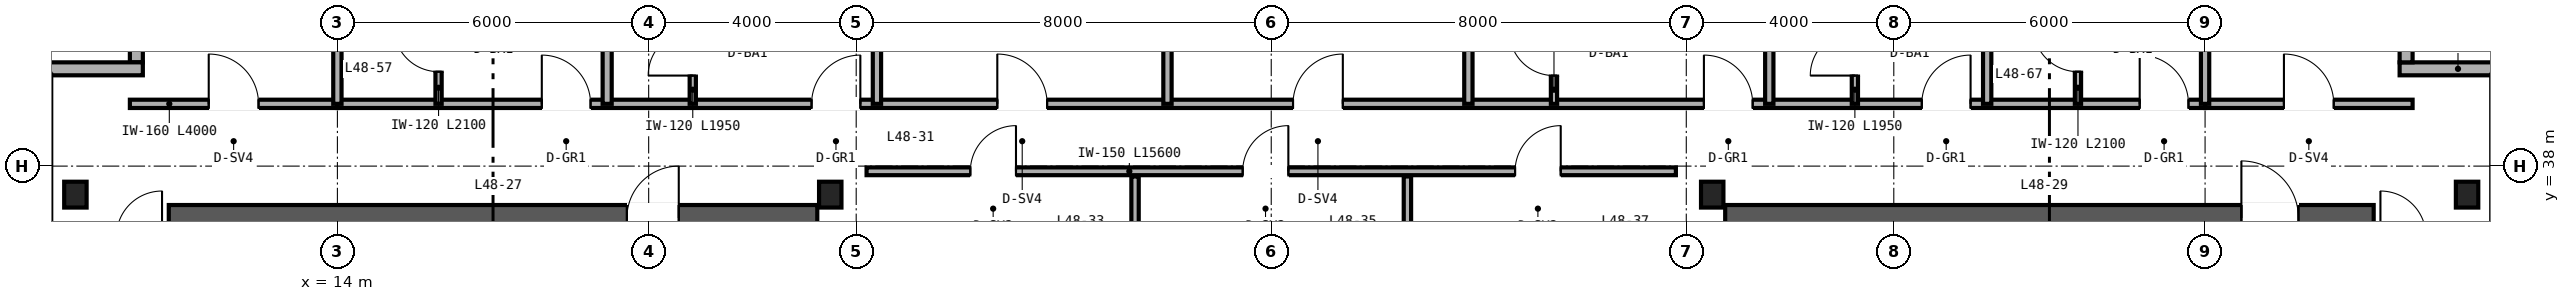
"""IFC4 building model, lengths in metres.
Left out: names, types, materials, properties, quantities, classifications, styles, units other than length and angle.
Written with IfcOpenShell. Run it as: python <this file> out.ifc"""

import sys

from ifc_helpers import new_model, si_unit, direction, frame, frame_2d, origin, origin_2d, place, context, subcontext, project, spatial, rectangle, i_section, extrude, source, transform, mapped, element, fill, save


model = new_model("IFC4")
c1 = context("Model", 3, precision=1e-05, world=origin(), true_north=direction((0.0, 1.0)))
c2 = subcontext(c1, "Body", "Model", "MODEL_VIEW")
j1 = project(units=[si_unit("LENGTHUNIT", "METRE"), si_unit("PLANEANGLEUNIT", "RADIAN")], contexts=[c1])
p1 = place(None, origin())
s1 = spatial("IfcSite", under=j1, at=p1, CompositionType="ELEMENT")
p2 = place(p1, origin())
s2 = spatial("IfcBuilding", under=s1, at=p2, CompositionType="ELEMENT")
p3 = place(p2, frame((0.0, 0.0, 192.0)))
s3 = spatial("IfcBuildingStorey", under=s2, at=p3, CompositionType="ELEMENT", Elevation=192.0)
p4 = place(p3, frame((10.75, 37.0, 0.0), z_axis=(0.0, 0.0, 1.0), x_axis=(1.0, 0.0, 0.0)))
e1 = element("IfcWall", 1, at=p4, inside=s3, PredefinedType="SHEAR", context=c2, shape_type="SweptSolid", body=[
    extrude(rectangle(XDim=12.5, YDim=0.5, at=frame_2d((6.25, 0.0))), origin(), (0.0, 0.0, 1.0), 3.37),
])
p5 = place(p4, frame((8.83, 0.0, 0.0)))
e2 = element("IfcOpeningElement", 2, at=p5, cuts=e1, PredefinedType="OPENING", context=c2, shape_type="SweptSolid", body=[
    extrude(rectangle(XDim=1.0, YDim=2.15, at=frame_2d((0.5, 1.075))), frame((0.0, 0.26, 0.0), z_axis=(0.0, -1.0, 0.0), x_axis=(1.0, 0.0, 0.0)), (0.0, 0.0, 1.0), 0.52),
])
p6 = place(p3, frame((40.75, 37.0, 0.0), z_axis=(0.0, 0.0, 1.0), x_axis=(1.0, 0.0, 0.0)))
e3 = element("IfcWall", 3, at=p6, inside=s3, PredefinedType="SHEAR", context=c2, shape_type="SweptSolid", body=[
    extrude(rectangle(XDim=12.5, YDim=0.5, at=frame_2d((6.25, 0.0))), origin(), (0.0, 0.0, 1.0), 3.37),
])
p7 = place(p6, frame((9.95, 0.0, 0.0)))
e4 = element("IfcOpeningElement", 4, at=p7, cuts=e3, PredefinedType="OPENING", context=c2, shape_type="SweptSolid", body=[
    extrude(rectangle(XDim=1.1, YDim=2.15, at=frame_2d((0.55, 1.075))), frame((0.0, 0.26, 0.0), z_axis=(0.0, -1.0, 0.0), x_axis=(1.0, 0.0, 0.0)), (0.0, 0.0, 1.0), 0.52),
])
m1 = source(origin(), c2, "Body", "SweptSolid", [
    extrude(i_section(OverallWidth=0.432, OverallDepth=0.498, WebThickness=0.056, FlangeThickness=0.089, FilletRadius=0.025, at=origin_2d()), origin(), (0.0, 0.0, 1.0), 3.37),
])
for number, where, z_axis, x_axis in (
    (5, (8.95, 37.45, 0.0), (0.0, 0.0, 1.0), (1.0, 0.0, 0.0)),
    (6, (23.5, 37.45, 0.0), (0.0, 0.0, 1.0), (1.0, 0.0, 0.0)),
    (7, (40.5, 37.45, 0.0), (0.0, 0.0, 1.0), (1.0, 0.0, 0.0)),
    (8, (55.05, 37.45, 0.0), (0.0, 0.0, 1.0), (1.0, 0.0, 0.0)),
):
    element("IfcColumn", number, at=place(p3, frame(where, z_axis=z_axis, x_axis=x_axis)), inside=s3, PredefinedType="COLUMN", context=c2, shape_type="MappedRepresentation", body=[
        mapped(m1, transform((0.0, 0.0, 0.0), scale=1.0)),
    ])
p8 = place(p3, frame((56.0, 39.875, 0.0), z_axis=(0.0, 0.0, 1.0), x_axis=(-1.0, 0.0, 0.0)))
e9 = element("IfcWall", 9, at=p8, inside=s3, PredefinedType="SOLIDWALL", context=c2, shape_type="SweptSolid", body=[
    extrude(rectangle(XDim=2.25, YDim=0.25, at=frame_2d((1.125, 0.0))), origin(), (0.0, 0.0, 1.0), 3.37),
])
for number, where, z_axis, x_axis in (
    (10, (53.875, 40.0, 0.0), (0.0, 0.0, 1.0), (0.0, 1.0, 0.0)),
    (11, (10.125, 42.0, 0.0), (0.0, 0.0, 1.0), (0.0, -1.0, 0.0)),
):
    element("IfcWall", number, at=place(p3, frame(where, z_axis=z_axis, x_axis=x_axis)), inside=s3, PredefinedType="SOLIDWALL", context=c2, shape_type="SweptSolid", body=[
        extrude(rectangle(XDim=2.0, YDim=0.25, at=frame_2d((1.0, 0.0))), origin(), (0.0, 0.0, 1.0), 3.37),
    ])
p9 = place(p3, frame((10.25, 39.875, 0.0), z_axis=(0.0, 0.0, 1.0), x_axis=(-1.0, 0.0, 0.0)))
e12 = element("IfcWall", 12, at=p9, inside=s3, PredefinedType="SOLIDWALL", context=c2, shape_type="SweptSolid", body=[
    extrude(rectangle(XDim=2.25, YDim=0.25, at=frame_2d((1.125, 0.0))), origin(), (0.0, 0.0, 1.0), 3.37),
])
p10 = place(p3, frame((24.2, 37.9, 0.0), z_axis=(0.0, 0.0, 1.0), x_axis=(1.0, 0.0, 0.0)))
e13 = element("IfcWall", 13, at=p10, inside=s3, PredefinedType="PARTITIONING", context=c2, shape_type="SweptSolid", body=[
    extrude(rectangle(XDim=15.6, YDim=0.15, at=frame_2d((7.8, 0.0))), origin(), (0.0, 0.0, 1.0), 3.37),
])
p11 = place(p10, frame((2.0, 0.0, 0.0)))
e14 = element("IfcOpeningElement", 14, at=p11, cuts=e13, PredefinedType="OPENING", context=c2, shape_type="SweptSolid", body=[
    extrude(rectangle(XDim=0.88, YDim=2.15, at=frame_2d((0.44, 1.075))), frame((0.0, 0.085, 0.0), z_axis=(0.0, -1.0, 0.0), x_axis=(1.0, 0.0, 0.0)), (0.0, 0.0, 1.0), 0.17),
])
p12 = place(p10, frame((7.25, 0.0, 0.0)))
e15 = element("IfcOpeningElement", 15, at=p12, cuts=e13, PredefinedType="OPENING", context=c2, shape_type="SweptSolid", body=[
    extrude(rectangle(XDim=0.88, YDim=2.15, at=frame_2d((0.44, 1.075))), frame((0.0, 0.085, 0.0), z_axis=(0.0, -1.0, 0.0), x_axis=(1.0, 0.0, 0.0)), (0.0, 0.0, 1.0), 0.17),
])
p13 = place(p10, frame((12.5, 0.0, 0.0)))
e16 = element("IfcOpeningElement", 16, at=p13, cuts=e13, PredefinedType="OPENING", context=c2, shape_type="SweptSolid", body=[
    extrude(rectangle(XDim=0.88, YDim=2.15, at=frame_2d((0.44, 1.075))), frame((0.0, 0.085, 0.0), z_axis=(0.0, -1.0, 0.0), x_axis=(1.0, 0.0, 0.0)), (0.0, 0.0, 1.0), 0.17),
])
for number, where, z_axis, x_axis in (
    (17, (29.375, 36.12, 0.0), (0.0, 0.0, 1.0), (0.0, 1.0, 0.0)),
    (18, (34.625, 36.12, 0.0), (0.0, 0.0, 1.0), (0.0, 1.0, 0.0)),
):
    element("IfcWall", number, at=place(p3, frame(where, z_axis=z_axis, x_axis=x_axis)), inside=s3, PredefinedType="PARTITIONING", context=c2, shape_type="SweptSolid", body=[
        extrude(rectangle(XDim=1.68, YDim=0.142, at=frame_2d((0.84, 0.0))), origin(), (0.0, 0.0, 1.0), 3.37),
    ])
p14 = place(p3, frame((10.0, 39.2, 0.0), z_axis=(0.0, 0.0, 1.0), x_axis=(1.0, 0.0, 0.0)))
e19 = element("IfcWall", 19, at=p14, inside=s3, PredefinedType="PARTITIONING", context=c2, shape_type="SweptSolid", body=[
    extrude(rectangle(XDim=4.0, YDim=0.16, at=frame_2d((2.0, 0.0))), origin(), (0.0, 0.0, 1.0), 3.37),
])
p15 = place(p14, frame((1.52, 0.0, 0.0)))
e20 = element("IfcOpeningElement", 20, at=p15, cuts=e19, PredefinedType="OPENING", context=c2, shape_type="SweptSolid", body=[
    extrude(rectangle(XDim=0.96, YDim=2.15, at=frame_2d((0.48, 1.075))), frame((0.0, 0.09, 0.0), z_axis=(0.0, -1.0, 0.0), x_axis=(1.0, 0.0, 0.0)), (0.0, 0.0, 1.0), 0.18),
])
p16 = place(p3, frame((50.0, 39.2, 0.0), z_axis=(0.0, 0.0, 1.0), x_axis=(1.0, 0.0, 0.0)))
e21 = element("IfcWall", 21, at=p16, inside=s3, PredefinedType="PARTITIONING", context=c2, shape_type="SweptSolid", body=[
    extrude(rectangle(XDim=4.0, YDim=0.16, at=frame_2d((2.0, 0.0))), origin(), (0.0, 0.0, 1.0), 3.37),
])
p17 = place(p16, frame((1.52, 0.0, 0.0)))
e22 = element("IfcOpeningElement", 22, at=p17, cuts=e21, PredefinedType="OPENING", context=c2, shape_type="SweptSolid", body=[
    extrude(rectangle(XDim=0.96, YDim=2.15, at=frame_2d((0.48, 1.075))), frame((0.0, 0.09, 0.0), z_axis=(0.0, -1.0, 0.0), x_axis=(1.0, 0.0, 0.0)), (0.0, 0.0, 1.0), 0.18),
])
p18 = place(p3, frame((14.0, 39.2, 0.0), z_axis=(0.0, 0.0, 1.0), x_axis=(1.0, 0.0, 0.0)))
e23 = element("IfcWall", 23, at=p18, inside=s3, PredefinedType="PARTITIONING", context=c2, shape_type="SweptSolid", body=[
    extrude(rectangle(XDim=36.0, YDim=0.16, at=frame_2d((18.0, 0.0))), origin(), (0.0, 0.0, 1.0), 2.913),
])
p19 = place(p18, frame((3.94, 0.0, 0.0)))
e24 = element("IfcOpeningElement", 24, at=p19, cuts=e23, PredefinedType="OPENING", context=c2, shape_type="SweptSolid", body=[
    extrude(rectangle(XDim=0.94, YDim=2.15, at=frame_2d((0.47, 1.075))), frame((0.0, 0.09, 0.0), z_axis=(0.0, -1.0, 0.0), x_axis=(1.0, 0.0, 0.0)), (0.0, 0.0, 1.0), 0.18),
])
p20 = place(p18, frame((9.14, 0.0, 0.0)))
e25 = element("IfcOpeningElement", 25, at=p20, cuts=e23, PredefinedType="OPENING", context=c2, shape_type="SweptSolid", body=[
    extrude(rectangle(XDim=0.94, YDim=2.15, at=frame_2d((0.47, 1.075))), frame((0.0, 0.09, 0.0), z_axis=(0.0, -1.0, 0.0), x_axis=(1.0, 0.0, 0.0)), (0.0, 0.0, 1.0), 0.18),
])
p21 = place(p18, frame((12.72, 0.0, 0.0)))
e26 = element("IfcOpeningElement", 26, at=p21, cuts=e23, PredefinedType="OPENING", context=c2, shape_type="SweptSolid", body=[
    extrude(rectangle(XDim=0.96, YDim=2.15, at=frame_2d((0.48, 1.075))), frame((0.0, 0.09, 0.0), z_axis=(0.0, -1.0, 0.0), x_axis=(1.0, 0.0, 0.0)), (0.0, 0.0, 1.0), 0.18),
])
p22 = place(p18, frame((18.42, 0.0, 0.0)))
e27 = element("IfcOpeningElement", 27, at=p22, cuts=e23, PredefinedType="OPENING", context=c2, shape_type="SweptSolid", body=[
    extrude(rectangle(XDim=0.96, YDim=2.15, at=frame_2d((0.48, 1.075))), frame((0.0, 0.09, 0.0), z_axis=(0.0, -1.0, 0.0), x_axis=(1.0, 0.0, 0.0)), (0.0, 0.0, 1.0), 0.18),
])
p23 = place(p18, frame((26.34, 0.0, 0.0)))
e28 = element("IfcOpeningElement", 28, at=p23, cuts=e23, PredefinedType="OPENING", context=c2, shape_type="SweptSolid", body=[
    extrude(rectangle(XDim=0.94, YDim=2.15, at=frame_2d((0.47, 1.075))), frame((0.0, 0.09, 0.0), z_axis=(0.0, -1.0, 0.0), x_axis=(1.0, 0.0, 0.0)), (0.0, 0.0, 1.0), 0.18),
])
p24 = place(p18, frame((30.54, 0.0, 0.0)))
e29 = element("IfcOpeningElement", 29, at=p24, cuts=e23, PredefinedType="OPENING", context=c2, shape_type="SweptSolid", body=[
    extrude(rectangle(XDim=0.94, YDim=2.15, at=frame_2d((0.47, 1.075))), frame((0.0, 0.09, 0.0), z_axis=(0.0, -1.0, 0.0), x_axis=(1.0, 0.0, 0.0)), (0.0, 0.0, 1.0), 0.18),
])
p25 = place(p18, frame((34.74, 0.0, 0.0)))
e30 = element("IfcOpeningElement", 30, at=p25, cuts=e23, PredefinedType="OPENING", context=c2, shape_type="SweptSolid", body=[
    extrude(rectangle(XDim=0.94, YDim=2.15, at=frame_2d((0.47, 1.075))), frame((0.0, 0.09, 0.0), z_axis=(0.0, -1.0, 0.0), x_axis=(1.0, 0.0, 0.0)), (0.0, 0.0, 1.0), 0.18),
])
for number, where, z_axis, x_axis in (
    (31, (14.0, 39.2, 0.0), (0.0, 0.0, 1.0), (0.0, 1.0, 0.0)),
    (32, (50.0, 39.2, 0.0), (0.0, 0.0, 1.0), (0.0, 1.0, 0.0)),
):
    element("IfcWall", number, at=place(p3, frame(where, z_axis=z_axis, x_axis=x_axis)), inside=s3, PredefinedType="PARTITIONING", context=c2, shape_type="SweptSolid", body=[
        extrude(rectangle(XDim=6.44, YDim=0.16, at=frame_2d((3.22, 0.0))), origin(), (0.0, 0.0, 1.0), 2.677),
    ])
p26 = place(p3, frame((19.2, 39.2, 0.0), z_axis=(0.0, 0.0, 1.0), x_axis=(0.0, 1.0, 0.0)))
e33 = element("IfcWall", 33, at=p26, inside=s3, PredefinedType="PARTITIONING", context=c2, shape_type="SweptSolid", body=[
    extrude(rectangle(XDim=6.44, YDim=0.175, at=frame_2d((3.22, 0.0))), origin(), (0.0, 0.0, 1.0), 2.677),
])
p27 = place(p3, frame((15.95, 39.2, 0.0), z_axis=(0.0, 0.0, 1.0), x_axis=(0.0, 1.0, 0.0)))
e34 = element("IfcWall", 34, at=p27, inside=s3, PredefinedType="PARTITIONING", context=c2, shape_type="SweptSolid", body=[
    extrude(rectangle(XDim=2.1, YDim=0.12, at=frame_2d((1.05, 0.0))), origin(), (0.0, 0.0, 1.0), 3.37),
])
p28 = place(p27, frame((0.62, 0.0, 0.0)))
e35 = element("IfcOpeningElement", 35, at=p28, cuts=e34, PredefinedType="OPENING", context=c2, shape_type="SweptSolid", body=[
    extrude(rectangle(XDim=0.86, YDim=2.1, at=frame_2d((0.43, 1.05))), frame((0.0, 0.07, 0.0), z_axis=(0.0, -1.0, 0.0), x_axis=(1.0, 0.0, 0.0)), (0.0, 0.0, 1.0), 0.14),
])
p29 = place(p3, frame((24.4, 39.2, 0.0), z_axis=(0.0, 0.0, 1.0), x_axis=(0.0, 1.0, 0.0)))
e36 = element("IfcWall", 36, at=p29, inside=s3, PredefinedType="PARTITIONING", context=c2, shape_type="SweptSolid", body=[
    extrude(rectangle(XDim=6.44, YDim=0.16, at=frame_2d((3.22, 0.0))), origin(), (0.0, 0.0, 1.0), 2.443),
])
p30 = place(p3, frame((20.85, 39.2, 0.0), z_axis=(0.0, 0.0, 1.0), x_axis=(0.0, 1.0, 0.0)))
e37 = element("IfcWall", 37, at=p30, inside=s3, PredefinedType="PARTITIONING", context=c2, shape_type="SweptSolid", body=[
    extrude(rectangle(XDim=1.95, YDim=0.12, at=frame_2d((0.975, 0.0))), origin(), (0.0, 0.0, 1.0), 3.37),
])
p31 = place(p30, frame((0.545, 0.0, 0.0)))
e38 = element("IfcOpeningElement", 38, at=p31, cuts=e37, PredefinedType="OPENING", context=c2, shape_type="SweptSolid", body=[
    extrude(rectangle(XDim=0.86, YDim=2.1, at=frame_2d((0.43, 1.05))), frame((0.0, 0.07, 0.0), z_axis=(0.0, -1.0, 0.0), x_axis=(1.0, 0.0, 0.0)), (0.0, 0.0, 1.0), 0.14),
])
for number, where, z_axis, x_axis in (
    (39, (30.0, 39.2, 0.0), (0.0, 0.0, 1.0), (0.0, 1.0, 0.0)),
    (40, (35.8, 39.2, 0.0), (0.0, 0.0, 1.0), (0.0, 1.0, 0.0)),
):
    element("IfcWall", number, at=place(p3, frame(where, z_axis=z_axis, x_axis=x_axis)), inside=s3, PredefinedType="PARTITIONING", context=c2, shape_type="SweptSolid", body=[
        extrude(rectangle(XDim=6.44, YDim=0.16, at=frame_2d((3.22, 0.0))), origin(), (0.0, 0.0, 1.0), 2.443),
    ])
p32 = place(p3, frame((41.6, 39.2, 0.0), z_axis=(0.0, 0.0, 1.0), x_axis=(0.0, 1.0, 0.0)))
e41 = element("IfcWall", 41, at=p32, inside=s3, PredefinedType="PARTITIONING", context=c2, shape_type="SweptSolid", body=[
    extrude(rectangle(XDim=6.44, YDim=0.16, at=frame_2d((3.22, 0.0))), origin(), (0.0, 0.0, 1.0), 2.833),
])
p33 = place(p3, frame((37.45, 39.2, 0.0), z_axis=(0.0, 0.0, 1.0), x_axis=(0.0, 1.0, 0.0)))
e42 = element("IfcWall", 42, at=p33, inside=s3, PredefinedType="PARTITIONING", context=c2, shape_type="SweptSolid", body=[
    extrude(rectangle(XDim=1.95, YDim=0.12, at=frame_2d((0.975, 0.0))), origin(), (0.0, 0.0, 1.0), 3.37),
])
p34 = place(p33, frame((0.545, 0.0, 0.0)))
e43 = element("IfcOpeningElement", 43, at=p34, cuts=e42, PredefinedType="OPENING", context=c2, shape_type="SweptSolid", body=[
    extrude(rectangle(XDim=0.86, YDim=2.1, at=frame_2d((0.43, 1.05))), frame((0.0, 0.07, 0.0), z_axis=(0.0, -1.0, 0.0), x_axis=(1.0, 0.0, 0.0)), (0.0, 0.0, 1.0), 0.14),
])
p35 = place(p3, frame((45.8, 39.2, 0.0), z_axis=(0.0, 0.0, 1.0), x_axis=(0.0, 1.0, 0.0)))
e44 = element("IfcWall", 44, at=p35, inside=s3, PredefinedType="PARTITIONING", context=c2, shape_type="SweptSolid", body=[
    extrude(rectangle(XDim=6.44, YDim=0.16, at=frame_2d((3.22, 0.0))), origin(), (0.0, 0.0, 1.0), 2.677),
])
p36 = place(p3, frame((43.25, 39.2, 0.0), z_axis=(0.0, 0.0, 1.0), x_axis=(0.0, 1.0, 0.0)))
e45 = element("IfcWall", 45, at=p36, inside=s3, PredefinedType="PARTITIONING", context=c2, shape_type="SweptSolid", body=[
    extrude(rectangle(XDim=1.95, YDim=0.12, at=frame_2d((0.975, 0.0))), origin(), (0.0, 0.0, 1.0), 3.37),
])
p37 = place(p36, frame((0.545, 0.0, 0.0)))
e46 = element("IfcOpeningElement", 46, at=p37, cuts=e45, PredefinedType="OPENING", context=c2, shape_type="SweptSolid", body=[
    extrude(rectangle(XDim=0.86, YDim=2.1, at=frame_2d((0.43, 1.05))), frame((0.0, 0.07, 0.0), z_axis=(0.0, -1.0, 0.0), x_axis=(1.0, 0.0, 0.0)), (0.0, 0.0, 1.0), 0.14),
])
p38 = place(p3, frame((47.55, 39.2, 0.0), z_axis=(0.0, 0.0, 1.0), x_axis=(0.0, 1.0, 0.0)))
e47 = element("IfcWall", 47, at=p38, inside=s3, PredefinedType="PARTITIONING", context=c2, shape_type="SweptSolid", body=[
    extrude(rectangle(XDim=2.1, YDim=0.12, at=frame_2d((1.05, 0.0))), origin(), (0.0, 0.0, 1.0), 3.37),
])
p39 = place(p38, frame((0.62, 0.0, 0.0)))
e48 = element("IfcOpeningElement", 48, at=p39, cuts=e47, PredefinedType="OPENING", context=c2, shape_type="SweptSolid", body=[
    extrude(rectangle(XDim=0.86, YDim=2.1, at=frame_2d((0.43, 1.05))), frame((0.0, 0.07, 0.0), z_axis=(0.0, -1.0, 0.0), x_axis=(1.0, 0.0, 0.0)), (0.0, 0.0, 1.0), 0.14),
])
m2 = source(origin(), c2, "Body", "SweptSolid", [
    extrude(rectangle(XDim=1.0, YDim=2.15, at=frame_2d((0.5, 1.075))), frame((0.0, 0.025, 0.0), z_axis=(0.0, -1.0, 0.0), x_axis=(1.0, 0.0, 0.0)), (0.0, 0.0, 1.0), 0.05),
])
p40 = place(p5, origin())
e49 = element("IfcDoor", 49, at=p40, inside=s3, OperationType="SINGLE_SWING_RIGHT", PredefinedType="DOOR", context=c2, shape_type="MappedRepresentation", body=[
    mapped(m2, transform((0.0, 0.0, 0.0), scale=1.0)),
])
fill(e2, e49)
m3 = source(origin(), c2, "Body", "SweptSolid", [
    extrude(rectangle(XDim=1.1, YDim=2.15, at=frame_2d((0.55, 1.075))), frame((0.0, 0.025, 0.0), z_axis=(0.0, -1.0, 0.0), x_axis=(1.0, 0.0, 0.0)), (0.0, 0.0, 1.0), 0.05),
])
p41 = place(p7, origin())
e50 = element("IfcDoor", 50, at=p41, inside=s3, OperationType="SINGLE_SWING_LEFT", PredefinedType="DOOR", context=c2, shape_type="MappedRepresentation", body=[
    mapped(m3, transform((0.0, 0.0, 0.0), scale=1.0)),
])
fill(e4, e50)
m4 = source(origin(), c2, "Body", "SweptSolid", [
    extrude(rectangle(XDim=0.88, YDim=2.15, at=frame_2d((0.44, 1.075))), frame((0.0, 0.025, 0.0), z_axis=(0.0, -1.0, 0.0), x_axis=(1.0, 0.0, 0.0)), (0.0, 0.0, 1.0), 0.05),
])
p42 = place(p11, origin())
e51 = element("IfcDoor", 51, at=p42, inside=s3, OperationType="SINGLE_SWING_RIGHT", PredefinedType="DOOR", context=c2, shape_type="MappedRepresentation", body=[
    mapped(m4, transform((0.0, 0.0, 0.0), scale=1.0)),
])
fill(e14, e51)
p43 = place(p12, origin())
e52 = element("IfcDoor", 52, at=p43, inside=s3, OperationType="SINGLE_SWING_RIGHT", PredefinedType="DOOR", context=c2, shape_type="MappedRepresentation", body=[
    mapped(m4, transform((0.0, 0.0, 0.0), scale=1.0)),
])
fill(e15, e52)
p44 = place(p13, origin())
e53 = element("IfcDoor", 53, at=p44, inside=s3, OperationType="SINGLE_SWING_RIGHT", PredefinedType="DOOR", context=c2, shape_type="MappedRepresentation", body=[
    mapped(m4, transform((0.0, 0.0, 0.0), scale=1.0)),
])
fill(e16, e53)
m5 = source(origin(), c2, "Body", "SweptSolid", [
    extrude(rectangle(XDim=0.96, YDim=2.15, at=frame_2d((0.48, 1.075))), frame((0.0, 0.025, 0.0), z_axis=(0.0, -1.0, 0.0), x_axis=(1.0, 0.0, 0.0)), (0.0, 0.0, 1.0), 0.05),
])
p45 = place(p15, origin())
e54 = element("IfcDoor", 54, at=p45, inside=s3, OperationType="SINGLE_SWING_LEFT", PredefinedType="DOOR", context=c2, shape_type="MappedRepresentation", body=[
    mapped(m5, transform((0.0, 0.0, 0.0), scale=1.0)),
])
fill(e20, e54)
p46 = place(p17, origin())
e55 = element("IfcDoor", 55, at=p46, inside=s3, OperationType="SINGLE_SWING_LEFT", PredefinedType="DOOR", context=c2, shape_type="MappedRepresentation", body=[
    mapped(m5, transform((0.0, 0.0, 0.0), scale=1.0)),
])
fill(e22, e55)
m6 = source(origin(), c2, "Body", "SweptSolid", [
    extrude(rectangle(XDim=0.86, YDim=2.1, at=frame_2d((0.43, 1.05))), frame((0.0, 0.025, 0.0), z_axis=(0.0, -1.0, 0.0), x_axis=(1.0, 0.0, 0.0)), (0.0, 0.0, 1.0), 0.05),
])
p47 = place(p28, origin())
e56 = element("IfcDoor", 56, at=p47, inside=s3, OperationType="SINGLE_SWING_RIGHT", PredefinedType="DOOR", context=c2, shape_type="MappedRepresentation", body=[
    mapped(m6, transform((0.0, 0.0, 0.0), scale=1.0)),
])
fill(e35, e56)
p48 = place(p31, origin())
e57 = element("IfcDoor", 57, at=p48, inside=s3, OperationType="SINGLE_SWING_LEFT", PredefinedType="DOOR", context=c2, shape_type="MappedRepresentation", body=[
    mapped(m6, transform((0.0, 0.0, 0.0), scale=1.0)),
])
fill(e38, e57)
p49 = place(p34, origin())
e58 = element("IfcDoor", 58, at=p49, inside=s3, OperationType="SINGLE_SWING_RIGHT", PredefinedType="DOOR", context=c2, shape_type="MappedRepresentation", body=[
    mapped(m6, transform((0.0, 0.0, 0.0), scale=1.0)),
])
fill(e43, e58)
p50 = place(p37, origin())
e59 = element("IfcDoor", 59, at=p50, inside=s3, OperationType="SINGLE_SWING_LEFT", PredefinedType="DOOR", context=c2, shape_type="MappedRepresentation", body=[
    mapped(m6, transform((0.0, 0.0, 0.0), scale=1.0)),
])
fill(e46, e59)
p51 = place(p39, origin())
e60 = element("IfcDoor", 60, at=p51, inside=s3, OperationType="SINGLE_SWING_RIGHT", PredefinedType="DOOR", context=c2, shape_type="MappedRepresentation", body=[
    mapped(m6, transform((0.0, 0.0, 0.0), scale=1.0)),
])
fill(e48, e60)
m7 = source(origin(), c2, "Body", "SweptSolid", [
    extrude(rectangle(XDim=0.94, YDim=2.15, at=frame_2d((0.47, 1.075))), frame((0.0, 0.025, 0.0), z_axis=(0.0, -1.0, 0.0), x_axis=(1.0, 0.0, 0.0)), (0.0, 0.0, 1.0), 0.05),
])
p52 = place(p19, origin())
e61 = element("IfcDoor", 61, at=p52, inside=s3, OperationType="SINGLE_SWING_LEFT", PredefinedType="DOOR", context=c2, shape_type="MappedRepresentation", body=[
    mapped(m7, transform((0.0, 0.0, 0.0), scale=1.0)),
])
fill(e24, e61)
p53 = place(p20, origin())
e62 = element("IfcDoor", 62, at=p53, inside=s3, OperationType="SINGLE_SWING_RIGHT", PredefinedType="DOOR", context=c2, shape_type="MappedRepresentation", body=[
    mapped(m7, transform((0.0, 0.0, 0.0), scale=1.0)),
])
fill(e25, e62)
p54 = place(p21, origin())
e63 = element("IfcDoor", 63, at=p54, inside=s3, OperationType="SINGLE_SWING_LEFT", PredefinedType="DOOR", context=c2, shape_type="MappedRepresentation", body=[
    mapped(m5, transform((0.0, 0.0, 0.0), scale=1.0)),
])
fill(e26, e63)
p55 = place(p22, origin())
e64 = element("IfcDoor", 64, at=p55, inside=s3, OperationType="SINGLE_SWING_RIGHT", PredefinedType="DOOR", context=c2, shape_type="MappedRepresentation", body=[
    mapped(m5, transform((0.0, 0.0, 0.0), scale=1.0)),
])
fill(e27, e64)
p56 = place(p23, origin())
e65 = element("IfcDoor", 65, at=p56, inside=s3, OperationType="SINGLE_SWING_LEFT", PredefinedType="DOOR", context=c2, shape_type="MappedRepresentation", body=[
    mapped(m7, transform((0.0, 0.0, 0.0), scale=1.0)),
])
fill(e28, e65)
p57 = place(p24, origin())
e66 = element("IfcDoor", 66, at=p57, inside=s3, OperationType="SINGLE_SWING_RIGHT", PredefinedType="DOOR", context=c2, shape_type="MappedRepresentation", body=[
    mapped(m7, transform((0.0, 0.0, 0.0), scale=1.0)),
])
fill(e29, e66)
p58 = place(p25, origin())
e67 = element("IfcDoor", 67, at=p58, inside=s3, OperationType="SINGLE_SWING_LEFT", PredefinedType="DOOR", context=c2, shape_type="MappedRepresentation", body=[
    mapped(m7, transform((0.0, 0.0, 0.0), scale=1.0)),
])
fill(e30, e67)
save(model, sys.argv[1])
